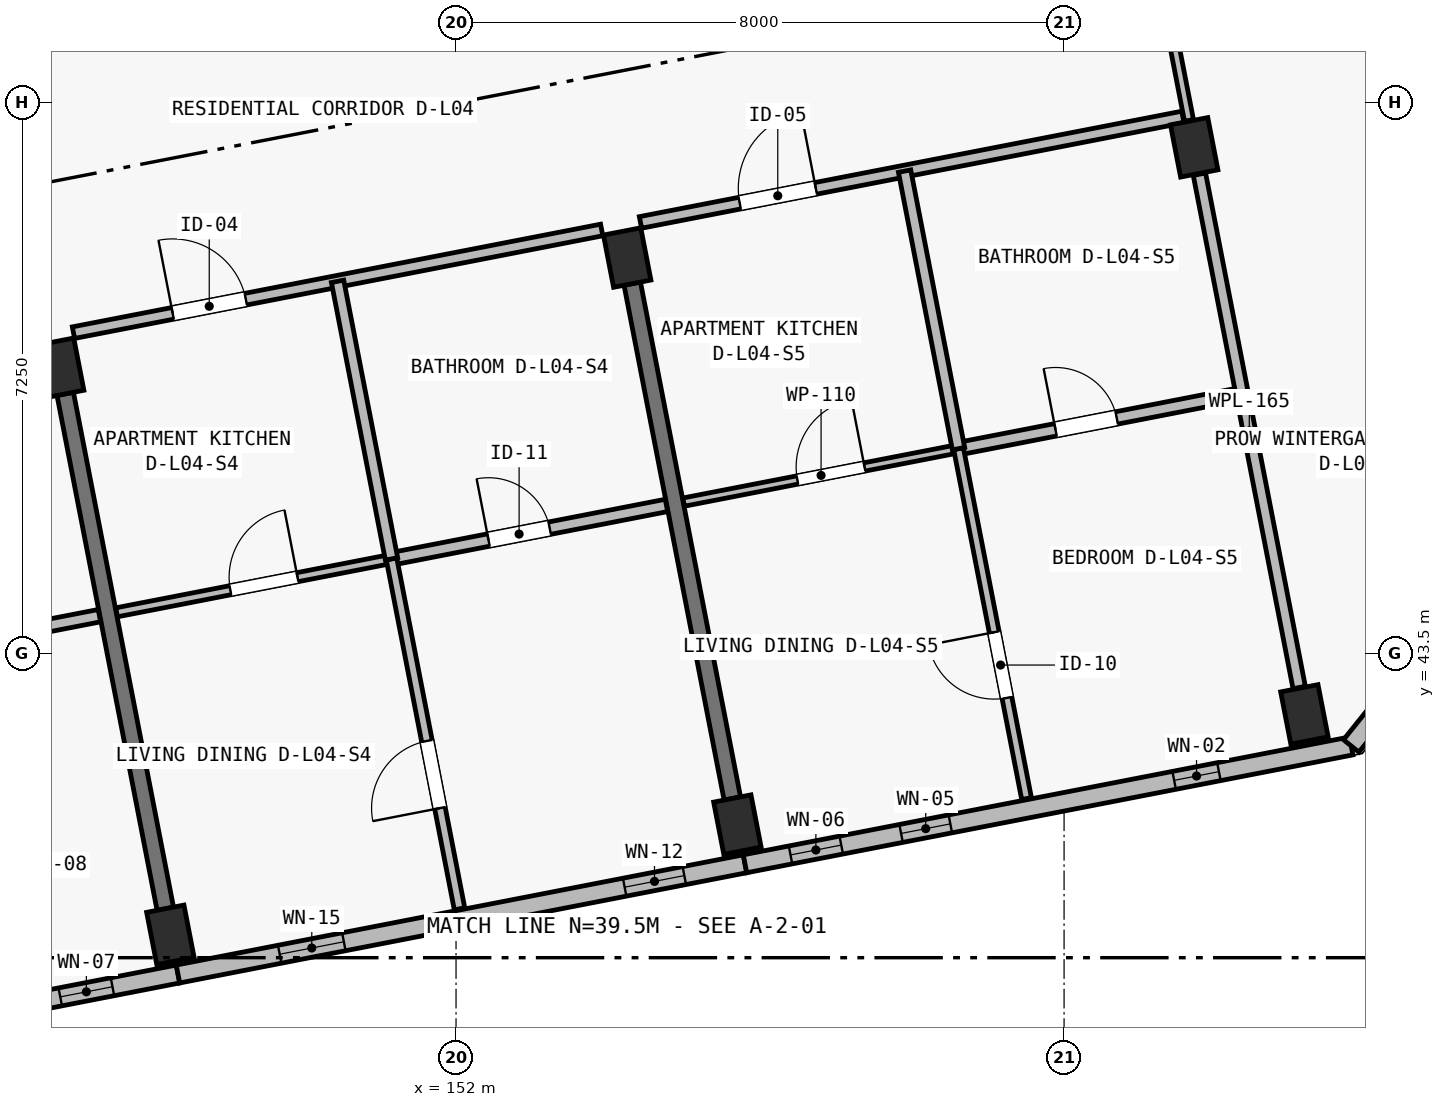
"""IFC4 building model, lengths in metres.
Left out: names, types, materials, properties, quantities, classifications, styles, units other than length and angle.
Written with IfcOpenShell. Run it as: python <this file> out.ifc"""

import sys

from ifc_helpers import new_model, si_unit, direction, frame, frame_2d, origin, origin_2d, place, context, subcontext, project, spatial, rectangle, extrude, element, fill, save


model = new_model("IFC4")
c1 = context("Model", 3, precision=1e-05, world=origin(), true_north=direction((0.0, 1.0)))
c2 = subcontext(c1, "Body", "Model", "MODEL_VIEW")
j1 = project(units=[si_unit("LENGTHUNIT", "METRE"), si_unit("PLANEANGLEUNIT", "RADIAN")], contexts=[c1])
p1 = place(None, origin())
s1 = spatial("IfcSite", under=j1, at=p1, CompositionType="ELEMENT")
p2 = place(p1, origin())
s2 = spatial("IfcBuilding", under=s1, at=p2, CompositionType="ELEMENT")
p3 = place(p2, frame((0.0, 0.0, 14.9)))
s3 = spatial("IfcBuildingStorey", under=s2, at=p3, CompositionType="ELEMENT", Elevation=14.9)
for number, where, z_axis, x_axis in (
    (1, (148.241, 39.801, 0.0), (0.0, 0.0, 1.0), (0.982, 0.191, 0.0)),
    (2, (146.791, 47.261, 0.0), (0.0, 0.0, 1.0), (0.982, 0.191, 0.0)),
    (3, (155.702, 41.251, 0.0), (0.0, 0.0, 1.0), (0.982, 0.191, 0.0)),
    (4, (154.252, 48.711, 0.0), (0.0, 0.0, 1.0), (0.982, 0.191, 0.0)),
    (5, (163.162, 42.701, 0.0), (0.0, 0.0, 1.0), (0.982, 0.191, 0.0)),
    (6, (161.712, 50.161, 0.0), (0.0, 0.0, 1.0), (0.982, 0.191, 0.0)),
):
    element("IfcColumn", number, at=place(p3, frame(where, z_axis=z_axis, x_axis=x_axis)), inside=s3, PredefinedType="COLUMN", context=c2, shape_type="SweptSolid", body=[
        extrude(rectangle(XDim=0.5, YDim=0.7, at=origin_2d()), origin(), (0.0, 0.0, 1.0), 3.25),
    ])
p4 = place(p3, frame((148.175, 40.144, 0.0), z_axis=(0.0, 0.0, 1.0), x_axis=(-0.190812837813, 0.981626436546, 0.0)))
e7 = element("IfcWall", 7, at=p4, inside=s3, PredefinedType="SHEAR", context=c2, shape_type="SweptSolid", body=[
    extrude(rectangle(XDim=6.9, YDim=0.22, at=frame_2d((3.45, 0.0))), origin(), (0.0, 0.0, 1.0), 2.5),
])
p5 = place(p3, frame((155.635, 41.594, 0.0), z_axis=(0.0, 0.0, 1.0), x_axis=(-0.190819465253, 0.981625148252, 0.0)))
e8 = element("IfcWall", 8, at=p5, inside=s3, PredefinedType="SHEAR", context=c2, shape_type="SweptSolid", body=[
    extrude(rectangle(XDim=6.9, YDim=0.22, at=frame_2d((3.45, 0.0))), origin(), (0.0, 0.0, 1.0), 2.5),
])
p6 = place(p3, frame((148.342, 39.285, 0.0), z_axis=(0.0, 0.0, 1.0), x_axis=(-0.981631269434, -0.190787973596, 0.0)))
e9 = element("IfcWall", 9, at=p6, inside=s3, PredefinedType="SOLIDWALL", context=c2, shape_type="SweptSolid", body=[
    extrude(rectangle(XDim=7.6, YDim=0.24, at=frame_2d((3.8, 0.0))), origin(), (0.0, 0.0, 1.0), 3.0),
])
p7 = place(p6, frame((0.878, 0.0, 0.48)))
e10 = element("IfcOpeningElement", 10, at=p7, cuts=e9, PredefinedType="OPENING", context=c2, shape_type="SweptSolid", body=[
    extrude(rectangle(XDim=0.7, YDim=2.36, at=frame_2d((0.35, 1.18))), frame((0.0, 0.135, 0.0), z_axis=(0.0, -1.0, 0.0), x_axis=(1.0, 0.0, 0.0)), (0.0, 0.0, 1.0), 0.27),
])
p8 = place(p6, frame((3.247, 0.0, 0.48)))
e11 = element("IfcOpeningElement", 11, at=p8, cuts=e9, PredefinedType="OPENING", context=c2, shape_type="SweptSolid", body=[
    extrude(rectangle(XDim=0.76, YDim=2.34, at=frame_2d((0.38, 1.17))), frame((0.0, 0.135, 0.0), z_axis=(0.0, -1.0, 0.0), x_axis=(1.0, 0.0, 0.0)), (0.0, 0.0, 1.0), 0.27),
])
p9 = place(p3, frame((155.802, 40.735, 0.0), z_axis=(0.0, 0.0, 1.0), x_axis=(-0.981626422232, -0.190812911449, 0.0)))
e12 = element("IfcWall", 12, at=p9, inside=s3, PredefinedType="SOLIDWALL", context=c2, shape_type="SweptSolid", body=[
    extrude(rectangle(XDim=7.6, YDim=0.24, at=frame_2d((3.8, 0.0))), origin(), (0.0, 0.0, 1.0), 3.0),
])
p10 = place(p9, frame((0.813, 0.0, 0.52)))
e13 = element("IfcOpeningElement", 13, at=p10, cuts=e12, PredefinedType="OPENING", context=c2, shape_type="SweptSolid", body=[
    extrude(rectangle(XDim=0.8, YDim=2.3, at=frame_2d((0.4, 1.15))), frame((0.0, 0.135, 0.0), z_axis=(0.0, -1.0, 0.0), x_axis=(1.0, 0.0, 0.0)), (0.0, 0.0, 1.0), 0.27),
])
p11 = place(p9, frame((5.377, 0.0, 0.5)))
e14 = element("IfcOpeningElement", 14, at=p11, cuts=e12, PredefinedType="OPENING", context=c2, shape_type="SweptSolid", body=[
    extrude(rectangle(XDim=0.86, YDim=2.36, at=frame_2d((0.43, 1.18))), frame((0.0, 0.135, 0.0), z_axis=(0.0, -1.0, 0.0), x_axis=(1.0, 0.0, 0.0)), (0.0, 0.0, 1.0), 0.27),
])
p12 = place(p3, frame((163.778, 42.286, 0.0), z_axis=(0.0, 0.0, 1.0), x_axis=(-0.981628367112, -0.190802905848, 0.0)))
e15 = element("IfcWall", 15, at=p12, inside=s3, PredefinedType="SOLIDWALL", context=c2, shape_type="SweptSolid", body=[
    extrude(rectangle(XDim=8.125, YDim=0.24, at=frame_2d((4.062, 0.0))), origin(), (0.0, 0.0, 1.0), 3.0),
])
p13 = place(p12, frame((1.773, 0.0, 0.42)))
e16 = element("IfcOpeningElement", 16, at=p13, cuts=e15, PredefinedType="OPENING", context=c2, shape_type="SweptSolid", body=[
    extrude(rectangle(XDim=0.6, YDim=2.22, at=frame_2d((0.3, 1.11))), frame((0.0, 0.135, 0.0), z_axis=(0.0, -1.0, 0.0), x_axis=(1.0, 0.0, 0.0)), (0.0, 0.0, 1.0), 0.27),
])
p14 = place(p12, frame((5.373, 0.0, 0.42)))
e17 = element("IfcOpeningElement", 17, at=p14, cuts=e15, PredefinedType="OPENING", context=c2, shape_type="SweptSolid", body=[
    extrude(rectangle(XDim=0.66, YDim=2.32, at=frame_2d((0.33, 1.16))), frame((0.0, 0.135, 0.0), z_axis=(0.0, -1.0, 0.0), x_axis=(1.0, 0.0, 0.0)), (0.0, 0.0, 1.0), 0.27),
])
p15 = place(p12, frame((6.835, 0.0, 0.48)))
e18 = element("IfcOpeningElement", 18, at=p15, cuts=e15, PredefinedType="OPENING", context=c2, shape_type="SweptSolid", body=[
    extrude(rectangle(XDim=0.68, YDim=2.24, at=frame_2d((0.34, 1.12))), frame((0.0, 0.135, 0.0), z_axis=(0.0, -1.0, 0.0), x_axis=(1.0, 0.0, 0.0)), (0.0, 0.0, 1.0), 0.27),
])
p16 = place(p3, frame((159.837, 62.556, 0.0), z_axis=(0.0, 0.0, 1.0), x_axis=(0.389225507936, -0.921142499276, 0.0)))
e19 = element("IfcWall", 19, at=p16, inside=s3, PredefinedType="SOLIDWALL", context=c2, shape_type="SweptSolid", body=[
    extrude(rectangle(XDim=17.91, YDim=0.26, at=frame_2d((8.955, 0.0))), origin(), (0.0, 0.0, 1.0), 3.0),
])
p17 = place(p16, frame((2.45, 0.0, 0.45)))
e20 = element("IfcOpeningElement", 20, at=p17, cuts=e19, PredefinedType="OPENING", context=c2, shape_type="SweptSolid", body=[
    extrude(rectangle(XDim=0.78, YDim=2.2, at=frame_2d((0.39, 1.1))), frame((0.0, 0.145, 0.0), z_axis=(0.0, -1.0, 0.0), x_axis=(1.0, 0.0, 0.0)), (0.0, 0.0, 1.0), 0.29),
])
p18 = place(p16, frame((14.84, 0.0, 0.52)))
e21 = element("IfcOpeningElement", 21, at=p18, cuts=e19, PredefinedType="OPENING", context=c2, shape_type="SweptSolid", body=[
    extrude(rectangle(XDim=0.62, YDim=2.28, at=frame_2d((0.31, 1.14))), frame((0.0, 0.145, 0.0), z_axis=(0.0, -1.0, 0.0), x_axis=(1.0, 0.0, 0.0)), (0.0, 0.0, 1.0), 0.29),
])
p19 = place(p3, frame((166.809, 46.058, 0.0), z_axis=(0.0, 0.0, 1.0), x_axis=(-0.626281072923, -0.779597343312, 0.0)))
e22 = element("IfcWall", 22, at=p19, inside=s3, PredefinedType="SOLIDWALL", context=c2, shape_type="SweptSolid", body=[
    extrude(rectangle(XDim=4.839, YDim=0.26, at=frame_2d((2.42, 0.0))), origin(), (0.0, 0.0, 1.0), 3.0),
])
p20 = place(p3, frame((161.643, 50.515, 0.0), z_axis=(0.0, 0.0, 1.0), x_axis=(-0.190805731561, 0.981627817864, 0.0)))
e23 = element("IfcWall", 23, at=p20, inside=s3, PredefinedType="PARTITIONING", context=c2, shape_type="SweptSolid", body=[
    extrude(rectangle(XDim=3.68, YDim=0.12, at=frame_2d((1.84, 0.0))), origin(), (0.0, 0.0, 1.0), 2.5),
])
p21 = place(p20, frame((1.35, 0.0, 0.0)))
e24 = element("IfcOpeningElement", 24, at=p21, cuts=e23, PredefinedType="OPENING", context=c2, shape_type="SweptSolid", body=[
    extrude(rectangle(XDim=0.9, YDim=2.1, at=frame_2d((0.45, 1.05))), frame((0.0, 0.075, 0.0), z_axis=(0.0, -1.0, 0.0), x_axis=(1.0, 0.0, 0.0)), (0.0, 0.0, 1.0), 0.15),
])
p22 = place(p3, frame((163.094, 43.054, 0.0), z_axis=(0.0, 0.0, 1.0), x_axis=(-0.190804123115, 0.981628130507, 0.0)))
e25 = element("IfcWall", 25, at=p22, inside=s3, PredefinedType="PLUMBINGWALL", context=c2, shape_type="SweptSolid", body=[
    extrude(rectangle(XDim=6.88, YDim=0.165, at=frame_2d((3.44, 0.0))), origin(), (0.0, 0.0, 1.0), 2.5),
])
p23 = place(p3, frame((145.06, 43.563, 0.0), z_axis=(0.0, 0.0, 1.0), x_axis=(0.981624265801, 0.190824004755, 0.0)))
e26 = element("IfcWall", 26, at=p23, inside=s3, PredefinedType="PLUMBINGWALL", context=c2, shape_type="SweptSolid", body=[
    extrude(rectangle(XDim=2.29, YDim=0.165, at=frame_2d((1.145, 0.0))), origin(), (0.0, 0.0, 1.0), 2.97),
])
p24 = place(p23, frame((0.602, 0.0, 0.0)))
e27 = element("IfcOpeningElement", 27, at=p24, cuts=e26, PredefinedType="OPENING", context=c2, shape_type="SweptSolid", body=[
    extrude(rectangle(XDim=0.82, YDim=2.08, at=frame_2d((0.41, 1.04))), frame((0.0, 0.097, 0.0), z_axis=(0.0, -1.0, 0.0), x_axis=(1.0, 0.0, 0.0)), (0.0, 0.0, 1.0), 0.195),
])
p25 = place(p3, frame((146.966, 47.723, 0.0), z_axis=(0.0, 0.0, 1.0), x_axis=(0.981629923556, 0.190794898199, 0.0)))
e28 = element("IfcWall", 28, at=p25, inside=s3, PredefinedType="PARTITIONING", context=c2, shape_type="SweptSolid", body=[
    extrude(rectangle(XDim=7.08, YDim=0.155, at=frame_2d((3.54, 0.0))), origin(), (0.0, 0.0, 1.0), 2.97),
])
p26 = place(p25, frame((1.33, 0.0, 0.0)))
e29 = element("IfcOpeningElement", 29, at=p26, cuts=e28, PredefinedType="OPENING", context=c2, shape_type="SweptSolid", body=[
    extrude(rectangle(XDim=0.98, YDim=2.15, at=frame_2d((0.49, 1.075))), frame((0.0, 0.093, 0.0), z_axis=(0.0, -1.0, 0.0), x_axis=(1.0, 0.0, 0.0)), (0.0, 0.0, 1.0), 0.185),
])
p27 = place(p3, frame((147.534, 44.043, 0.0), z_axis=(0.0, 0.0, 1.0), x_axis=(0.981626422232, 0.190812911449, 0.0)))
e30 = element("IfcWall", 30, at=p27, inside=s3, PredefinedType="PARTITIONING", context=c2, shape_type="SweptSolid", body=[
    extrude(rectangle(XDim=3.685, YDim=0.12, at=frame_2d((1.842, 0.0))), origin(), (0.0, 0.0, 1.0), 2.97),
])
p28 = place(p27, frame((1.525, 0.0, 0.0)))
e31 = element("IfcOpeningElement", 31, at=p28, cuts=e30, PredefinedType="OPENING", context=c2, shape_type="SweptSolid", body=[
    extrude(rectangle(XDim=0.9, YDim=2.1, at=frame_2d((0.45, 1.05))), frame((0.0, 0.075, 0.0), z_axis=(0.0, -1.0, 0.0), x_axis=(1.0, 0.0, 0.0)), (0.0, 0.0, 1.0), 0.15),
])
p29 = place(p3, frame((151.151, 44.747, 0.0), z_axis=(0.0, 0.0, 1.0), x_axis=(0.981628834294, 0.190800502313, 0.0)))
e32 = element("IfcWall", 32, at=p29, inside=s3, PredefinedType="PLUMBINGWALL", context=c2, shape_type="SweptSolid", body=[
    extrude(rectangle(XDim=3.685, YDim=0.165, at=frame_2d((1.843, 0.0))), origin(), (0.0, 0.0, 1.0), 2.97),
])
p30 = place(p29, frame((1.3, 0.0, 0.0)))
e33 = element("IfcOpeningElement", 33, at=p30, cuts=e32, PredefinedType="OPENING", context=c2, shape_type="SweptSolid", body=[
    extrude(rectangle(XDim=0.82, YDim=2.08, at=frame_2d((0.41, 1.04))), frame((0.0, 0.097, 0.0), z_axis=(0.0, -1.0, 0.0), x_axis=(1.0, 0.0, 0.0)), (0.0, 0.0, 1.0), 0.195),
])
p31 = place(p3, frame((152.046, 40.143, 0.0), z_axis=(0.0, 0.0, 1.0), x_axis=(-0.190837612577, 0.981621620394, 0.0)))
e34 = element("IfcWall", 34, at=p31, inside=s3, PredefinedType="PARTITIONING", context=c2, shape_type="SweptSolid", body=[
    extrude(rectangle(XDim=4.69, YDim=0.14, at=frame_2d((2.345, 0.0))), origin(), (0.0, 0.0, 1.0), 2.97),
])
p32 = place(p31, frame((1.35, 0.0, 0.0)))
e35 = element("IfcOpeningElement", 35, at=p32, cuts=e34, PredefinedType="OPENING", context=c2, shape_type="SweptSolid", body=[
    extrude(rectangle(XDim=0.9, YDim=2.1, at=frame_2d((0.45, 1.05))), frame((0.0, 0.085, 0.0), z_axis=(0.0, -1.0, 0.0), x_axis=(1.0, 0.0, 0.0)), (0.0, 0.0, 1.0), 0.17),
])
p33 = place(p3, frame((151.151, 44.747, 0.0), z_axis=(0.0, 0.0, 1.0), x_axis=(-0.190774805453, 0.981633828678, 0.0)))
e36 = element("IfcWall", 36, at=p33, inside=s3, PredefinedType="PLUMBINGWALL", context=c2, shape_type="SweptSolid", body=[
    extrude(rectangle(XDim=3.72, YDim=0.165, at=frame_2d((1.86, 0.0))), origin(), (0.0, 0.0, 1.0), 2.97),
])
p34 = place(p3, frame((154.427, 49.173, 0.0), z_axis=(0.0, 0.0, 1.0), x_axis=(0.981626748283, 0.190811234092, 0.0)))
e37 = element("IfcWall", 37, at=p34, inside=s3, PredefinedType="PARTITIONING", context=c2, shape_type="SweptSolid", body=[
    extrude(rectangle(XDim=7.27, YDim=0.155, at=frame_2d((3.635, 0.0))), origin(), (0.0, 0.0, 1.0), 2.97),
])
p35 = place(p34, frame((1.33, 0.0, 0.0)))
e38 = element("IfcOpeningElement", 38, at=p35, cuts=e37, PredefinedType="OPENING", context=c2, shape_type="SweptSolid", body=[
    extrude(rectangle(XDim=1.02, YDim=2.2, at=frame_2d((0.51, 1.1))), frame((0.0, 0.093, 0.0), z_axis=(0.0, -1.0, 0.0), x_axis=(1.0, 0.0, 0.0)), (0.0, 0.0, 1.0), 0.185),
])
p36 = place(p3, frame((154.994, 45.494, 0.0), z_axis=(0.0, 0.0, 1.0), x_axis=(0.981628834294, 0.190800502313, 0.0)))
e39 = element("IfcWall", 39, at=p36, inside=s3, PredefinedType="PARTITIONING", context=c2, shape_type="SweptSolid", body=[
    extrude(rectangle(XDim=3.685, YDim=0.11, at=frame_2d((1.843, 0.0))), origin(), (0.0, 0.0, 1.0), 2.97),
])
p37 = place(p36, frame((1.525, 0.0, 0.0)))
e40 = element("IfcOpeningElement", 40, at=p37, cuts=e39, PredefinedType="OPENING", context=c2, shape_type="SweptSolid", body=[
    extrude(rectangle(XDim=0.9, YDim=2.1, at=frame_2d((0.45, 1.05))), frame((0.0, 0.07, 0.0), z_axis=(0.0, -1.0, 0.0), x_axis=(1.0, 0.0, 0.0)), (0.0, 0.0, 1.0), 0.14),
])
p38 = place(p3, frame((158.612, 46.197, 0.0), z_axis=(0.0, 0.0, 1.0), x_axis=(0.981621896267, 0.190836193549, 0.0)))
e41 = element("IfcWall", 41, at=p38, inside=s3, PredefinedType="PLUMBINGWALL", context=c2, shape_type="SweptSolid", body=[
    extrude(rectangle(XDim=3.71, YDim=0.165, at=frame_2d((1.855, 0.0))), origin(), (0.0, 0.0, 1.0), 2.97),
])
p39 = place(p38, frame((1.3, 0.0, 0.0)))
e42 = element("IfcOpeningElement", 42, at=p39, cuts=e41, PredefinedType="OPENING", context=c2, shape_type="SweptSolid", body=[
    extrude(rectangle(XDim=0.82, YDim=2.08, at=frame_2d((0.41, 1.04))), frame((0.0, 0.097, 0.0), z_axis=(0.0, -1.0, 0.0), x_axis=(1.0, 0.0, 0.0)), (0.0, 0.0, 1.0), 0.195),
])
p40 = place(p3, frame((159.506, 41.593, 0.0), z_axis=(0.0, 0.0, 1.0), x_axis=(-0.190787451574, 0.981631370893, 0.0)))
e43 = element("IfcWall", 43, at=p40, inside=s3, PredefinedType="PARTITIONING", context=c2, shape_type="SweptSolid", body=[
    extrude(rectangle(XDim=4.69, YDim=0.13, at=frame_2d((2.345, 0.0))), origin(), (0.0, 0.0, 1.0), 2.97),
])
p41 = place(p40, frame((1.35, 0.0, 0.0)))
e44 = element("IfcOpeningElement", 44, at=p41, cuts=e43, PredefinedType="OPENING", context=c2, shape_type="SweptSolid", body=[
    extrude(rectangle(XDim=0.88, YDim=2.1, at=frame_2d((0.44, 1.05))), frame((0.0, 0.08, 0.0), z_axis=(0.0, -1.0, 0.0), x_axis=(1.0, 0.0, 0.0)), (0.0, 0.0, 1.0), 0.16),
])
p42 = place(p3, frame((158.612, 46.197, 0.0), z_axis=(0.0, 0.0, 1.0), x_axis=(-0.190850336204, 0.981619146701, 0.0)))
e45 = element("IfcWall", 45, at=p42, inside=s3, PredefinedType="PLUMBINGWALL", context=c2, shape_type="SweptSolid", body=[
    extrude(rectangle(XDim=3.72, YDim=0.165, at=frame_2d((1.86, 0.0))), origin(), (0.0, 0.0, 1.0), 2.97),
])
p43 = place(p7, origin())
e46 = element("IfcWindow", 46, at=p43, inside=s3, PartitioningType="SINGLE_PANEL", PredefinedType="WINDOW", context=c2, shape_type="SweptSolid", body=[
    extrude(rectangle(XDim=0.7, YDim=2.36, at=frame_2d((0.35, 1.18))), frame((0.0, 0.03, 0.0), z_axis=(0.0, -1.0, 0.0), x_axis=(1.0, 0.0, 0.0)), (0.0, 0.0, 1.0), 0.06),
])
fill(e10, e46)
p44 = place(p10, origin())
e47 = element("IfcWindow", 47, at=p44, inside=s3, PartitioningType="SINGLE_PANEL", PredefinedType="WINDOW", context=c2, shape_type="SweptSolid", body=[
    extrude(rectangle(XDim=0.8, YDim=2.3, at=frame_2d((0.4, 1.15))), frame((0.0, 0.03, 0.0), z_axis=(0.0, -1.0, 0.0), x_axis=(1.0, 0.0, 0.0)), (0.0, 0.0, 1.0), 0.06),
])
fill(e13, e47)
p45 = place(p11, origin())
e48 = element("IfcWindow", 48, at=p45, inside=s3, PartitioningType="SINGLE_PANEL", PredefinedType="WINDOW", context=c2, shape_type="SweptSolid", body=[
    extrude(rectangle(XDim=0.86, YDim=2.36, at=frame_2d((0.43, 1.18))), frame((0.0, 0.03, 0.0), z_axis=(0.0, -1.0, 0.0), x_axis=(1.0, 0.0, 0.0)), (0.0, 0.0, 1.0), 0.06),
])
fill(e14, e48)
p46 = place(p13, origin())
e49 = element("IfcWindow", 49, at=p46, inside=s3, PartitioningType="SINGLE_PANEL", PredefinedType="WINDOW", context=c2, shape_type="SweptSolid", body=[
    extrude(rectangle(XDim=0.6, YDim=2.22, at=frame_2d((0.3, 1.11))), frame((0.0, 0.03, 0.0), z_axis=(0.0, -1.0, 0.0), x_axis=(1.0, 0.0, 0.0)), (0.0, 0.0, 1.0), 0.06),
])
fill(e16, e49)
p47 = place(p14, origin())
e50 = element("IfcWindow", 50, at=p47, inside=s3, PartitioningType="SINGLE_PANEL", PredefinedType="WINDOW", context=c2, shape_type="SweptSolid", body=[
    extrude(rectangle(XDim=0.66, YDim=2.32, at=frame_2d((0.33, 1.16))), frame((0.0, 0.03, 0.0), z_axis=(0.0, -1.0, 0.0), x_axis=(1.0, 0.0, 0.0)), (0.0, 0.0, 1.0), 0.06),
])
fill(e17, e50)
p48 = place(p15, origin())
e51 = element("IfcWindow", 51, at=p48, inside=s3, PartitioningType="SINGLE_PANEL", PredefinedType="WINDOW", context=c2, shape_type="SweptSolid", body=[
    extrude(rectangle(XDim=0.68, YDim=2.24, at=frame_2d((0.34, 1.12))), frame((0.0, 0.03, 0.0), z_axis=(0.0, -1.0, 0.0), x_axis=(1.0, 0.0, 0.0)), (0.0, 0.0, 1.0), 0.06),
])
fill(e18, e51)
p49 = place(p26, origin())
e52 = element("IfcDoor", 52, at=p49, inside=s3, OperationType="SINGLE_SWING_LEFT", PredefinedType="DOOR", context=c2, shape_type="SweptSolid", body=[
    extrude(rectangle(XDim=0.98, YDim=2.15, at=frame_2d((0.49, 1.075))), frame((0.0, 0.025, 0.0), z_axis=(0.0, -1.0, 0.0), x_axis=(1.0, 0.0, 0.0)), (0.0, 0.0, 1.0), 0.05),
])
fill(e29, e52)
p50 = place(p28, origin())
e53 = element("IfcDoor", 53, at=p50, inside=s3, OperationType="SINGLE_SWING_RIGHT", PredefinedType="DOOR", context=c2, shape_type="SweptSolid", body=[
    extrude(rectangle(XDim=0.9, YDim=2.1, at=frame_2d((0.45, 1.05))), frame((0.0, 0.025, 0.0), z_axis=(0.0, -1.0, 0.0), x_axis=(1.0, 0.0, 0.0)), (0.0, 0.0, 1.0), 0.05),
])
fill(e31, e53)
p51 = place(p30, origin())
e54 = element("IfcDoor", 54, at=p51, inside=s3, OperationType="SINGLE_SWING_LEFT", PredefinedType="DOOR", context=c2, shape_type="SweptSolid", body=[
    extrude(rectangle(XDim=0.82, YDim=2.08, at=frame_2d((0.41, 1.04))), frame((0.0, 0.025, 0.0), z_axis=(0.0, -1.0, 0.0), x_axis=(1.0, 0.0, 0.0)), (0.0, 0.0, 1.0), 0.05),
])
fill(e33, e54)
p52 = place(p32, origin())
e55 = element("IfcDoor", 55, at=p52, inside=s3, OperationType="SINGLE_SWING_LEFT", PredefinedType="DOOR", context=c2, shape_type="SweptSolid", body=[
    extrude(rectangle(XDim=0.9, YDim=2.1, at=frame_2d((0.45, 1.05))), frame((0.0, 0.025, 0.0), z_axis=(0.0, -1.0, 0.0), x_axis=(1.0, 0.0, 0.0)), (0.0, 0.0, 1.0), 0.05),
])
fill(e35, e55)
p53 = place(p35, origin())
e56 = element("IfcDoor", 56, at=p53, inside=s3, OperationType="SINGLE_SWING_RIGHT", PredefinedType="DOOR", context=c2, shape_type="SweptSolid", body=[
    extrude(rectangle(XDim=1.02, YDim=2.2, at=frame_2d((0.51, 1.1))), frame((0.0, 0.025, 0.0), z_axis=(0.0, -1.0, 0.0), x_axis=(1.0, 0.0, 0.0)), (0.0, 0.0, 1.0), 0.05),
])
fill(e38, e56)
p54 = place(p37, origin())
e57 = element("IfcDoor", 57, at=p54, inside=s3, OperationType="SINGLE_SWING_RIGHT", PredefinedType="DOOR", context=c2, shape_type="SweptSolid", body=[
    extrude(rectangle(XDim=0.9, YDim=2.1, at=frame_2d((0.45, 1.05))), frame((0.0, 0.025, 0.0), z_axis=(0.0, -1.0, 0.0), x_axis=(1.0, 0.0, 0.0)), (0.0, 0.0, 1.0), 0.05),
])
fill(e40, e57)
p55 = place(p39, origin())
e58 = element("IfcDoor", 58, at=p55, inside=s3, OperationType="SINGLE_SWING_LEFT", PredefinedType="DOOR", context=c2, shape_type="SweptSolid", body=[
    extrude(rectangle(XDim=0.82, YDim=2.08, at=frame_2d((0.41, 1.04))), frame((0.0, 0.025, 0.0), z_axis=(0.0, -1.0, 0.0), x_axis=(1.0, 0.0, 0.0)), (0.0, 0.0, 1.0), 0.05),
])
fill(e42, e58)
p56 = place(p41, origin())
e59 = element("IfcDoor", 59, at=p56, inside=s3, OperationType="SINGLE_SWING_RIGHT", PredefinedType="DOOR", context=c2, shape_type="SweptSolid", body=[
    extrude(rectangle(XDim=0.88, YDim=2.1, at=frame_2d((0.44, 1.05))), frame((0.0, 0.025, 0.0), z_axis=(0.0, -1.0, 0.0), x_axis=(1.0, 0.0, 0.0)), (0.0, 0.0, 1.0), 0.05),
])
fill(e44, e59)
save(model, sys.argv[1])
